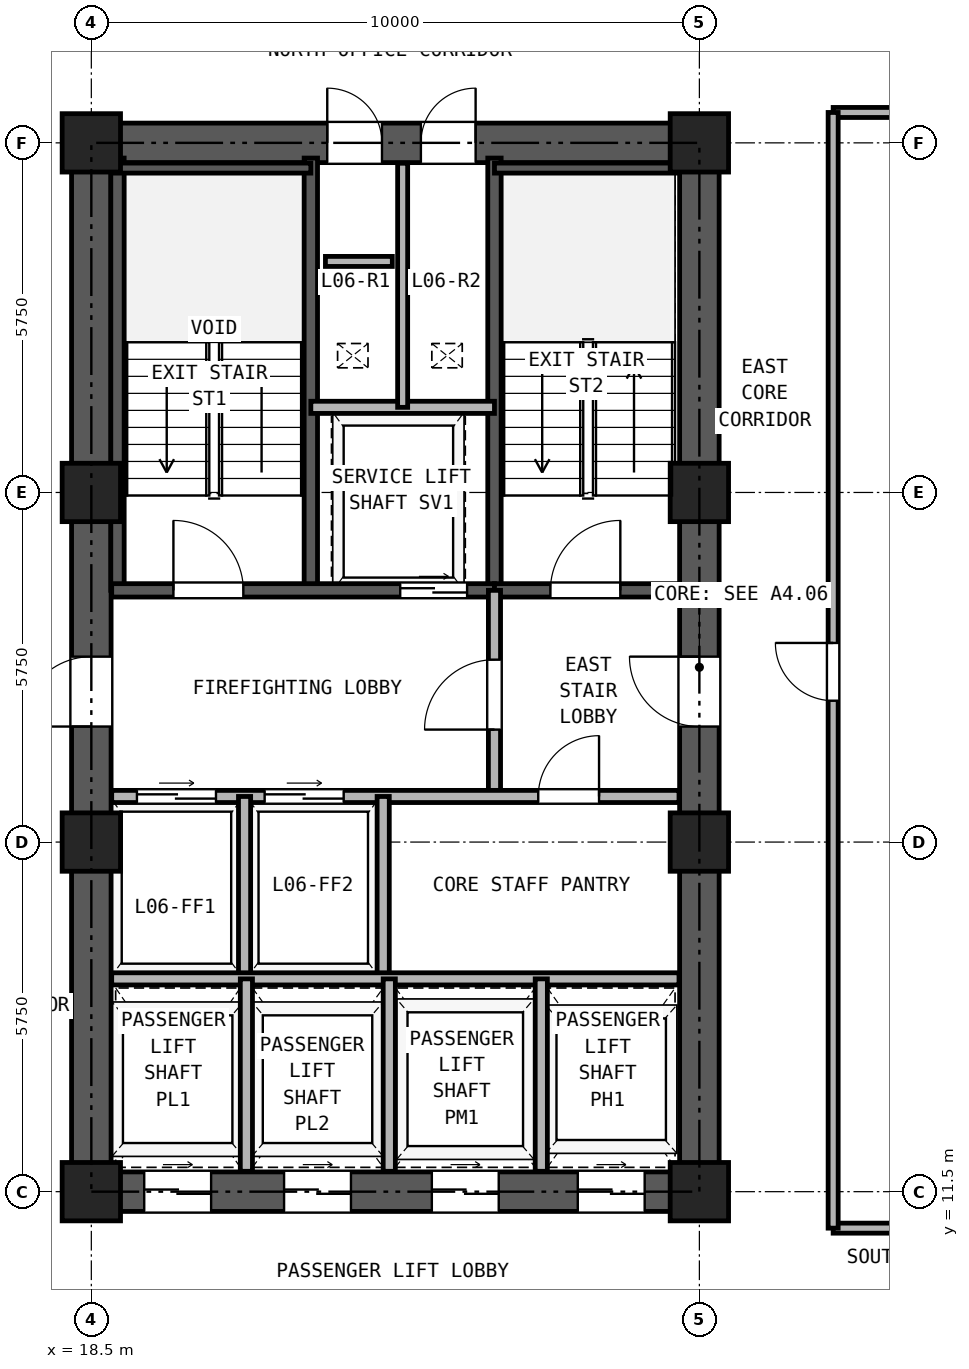
"""IFC4 building model, lengths in metres.
Left out: names, types, materials, properties, quantities, classifications, styles, units other than length and angle.
Written with IfcOpenShell. Run it as: python <this file> out.ifc"""

import sys

from ifc_helpers import new_model, si_unit, direction, frame, frame_2d, origin, origin_2d, place, context, subcontext, project, spatial, rectangle, hollow_rectangle, extrude, source, transform, mapped, element, fill, save


model = new_model("IFC4")
c1 = context("Model", 3, precision=1e-05, world=origin(), true_north=direction((0.0, 1.0)))
c2 = subcontext(c1, "Body", "Model", "MODEL_VIEW")
j1 = project(units=[si_unit("LENGTHUNIT", "METRE"), si_unit("PLANEANGLEUNIT", "RADIAN")], contexts=[c1])
p1 = place(None, origin())
s1 = spatial("IfcSite", under=j1, at=p1, CompositionType="ELEMENT")
p2 = place(p1, origin())
s2 = spatial("IfcBuilding", under=s1, at=p2, CompositionType="ELEMENT")
p3 = place(p2, frame((0.0, 0.0, 26.1)))
s3 = spatial("IfcBuildingStorey", under=s2, at=p3, CompositionType="ELEMENT", Elevation=26.1)
m1 = source(origin(), c2, "Body", "SweptSolid", [
    extrude(hollow_rectangle(XDim=0.96, YDim=0.96, WallThickness=0.06, at=origin_2d()), origin(), (0.0, 0.0, 1.0), 3.32),
])
for number, where, z_axis, x_axis in (
    (1, (18.5, 11.5, 0.0), (0.0, 0.0, 1.0), (1.0, 0.0, 0.0)),
    (2, (18.5, 17.25, 0.0), (0.0, 0.0, 1.0), (1.0, 0.0, 0.0)),
    (3, (18.5, 23.0, 0.0), (0.0, 0.0, 1.0), (1.0, 0.0, 0.0)),
    (4, (18.5, 28.75, 0.0), (0.0, 0.0, 1.0), (1.0, 0.0, 0.0)),
    (5, (28.5, 11.5, 0.0), (0.0, 0.0, 1.0), (1.0, 0.0, 0.0)),
    (6, (28.5, 17.25, 0.0), (0.0, 0.0, 1.0), (1.0, 0.0, 0.0)),
    (7, (28.5, 23.0, 0.0), (0.0, 0.0, 1.0), (1.0, 0.0, 0.0)),
    (8, (28.5, 28.75, 0.0), (0.0, 0.0, 1.0), (1.0, 0.0, 0.0)),
):
    element("IfcColumn", number, at=place(p3, frame(where, z_axis=z_axis, x_axis=x_axis)), inside=s3, PredefinedType="COLUMN", context=c2, shape_type="MappedRepresentation", body=[
        mapped(m1, transform((0.0, 0.0, 0.0), x_axis=(1.0, 0.0, 0.0), y_axis=(0.0, 1.0, 0.0), z_axis=(0.0, 0.0, 1.0), scale=1.0)),
    ])
p4 = place(p3, frame((18.175, 11.5, 0.0), z_axis=(0.0, 0.0, 1.0), x_axis=(1.0, 0.0, 0.0)))
e9 = element("IfcWall", 9, at=p4, inside=s3, PredefinedType="SHEAR", context=c2, shape_type="SweptSolid", body=[
    extrude(rectangle(XDim=10.65, YDim=0.65, at=frame_2d((5.325, 0.0))), origin(), (0.0, 0.0, 1.0), 3.32),
])
p5 = place(p4, frame((1.195, 0.0, 0.0)))
e10 = element("IfcOpeningElement", 10, at=p5, cuts=e9, PredefinedType="OPENING", context=c2, shape_type="SweptSolid", body=[
    extrude(rectangle(XDim=1.1, YDim=2.25, at=frame_2d((0.55, 1.125))), frame((0.0, 0.335, 0.0), z_axis=(0.0, -1.0, 0.0), x_axis=(1.0, 0.0, 0.0)), (0.0, 0.0, 1.0), 0.67),
])
p6 = place(p4, frame((3.495, 0.0, 0.0)))
e11 = element("IfcOpeningElement", 11, at=p6, cuts=e9, PredefinedType="OPENING", context=c2, shape_type="SweptSolid", body=[
    extrude(rectangle(XDim=1.1, YDim=2.25, at=frame_2d((0.55, 1.125))), frame((0.0, 0.335, 0.0), z_axis=(0.0, -1.0, 0.0), x_axis=(1.0, 0.0, 0.0)), (0.0, 0.0, 1.0), 0.67),
])
p7 = place(p4, frame((5.925, 0.0, 0.0)))
e12 = element("IfcOpeningElement", 12, at=p7, cuts=e9, PredefinedType="OPENING", context=c2, shape_type="SweptSolid", body=[
    extrude(rectangle(XDim=1.1, YDim=2.25, at=frame_2d((0.55, 1.125))), frame((0.0, 0.335, 0.0), z_axis=(0.0, -1.0, 0.0), x_axis=(1.0, 0.0, 0.0)), (0.0, 0.0, 1.0), 0.67),
])
p8 = place(p4, frame((8.325, 0.0, 0.0)))
e13 = element("IfcOpeningElement", 13, at=p8, cuts=e9, PredefinedType="OPENING", context=c2, shape_type="SweptSolid", body=[
    extrude(rectangle(XDim=1.1, YDim=2.25, at=frame_2d((0.55, 1.125))), frame((0.0, 0.335, 0.0), z_axis=(0.0, -1.0, 0.0), x_axis=(1.0, 0.0, 0.0)), (0.0, 0.0, 1.0), 0.67),
])
p9 = place(p3, frame((18.175, 28.75, 0.0), z_axis=(0.0, 0.0, 1.0), x_axis=(1.0, 0.0, 0.0)))
e14 = element("IfcWall", 14, at=p9, inside=s3, PredefinedType="SHEAR", context=c2, shape_type="SweptSolid", body=[
    extrude(rectangle(XDim=10.65, YDim=0.65, at=frame_2d((5.325, 0.0))), origin(), (0.0, 0.0, 1.0), 3.32),
])
p10 = place(p9, frame((4.205, 0.0, 0.0)))
e15 = element("IfcOpeningElement", 15, at=p10, cuts=e14, PredefinedType="OPENING", context=c2, shape_type="SweptSolid", body=[
    extrude(rectangle(XDim=0.9, YDim=2.05, at=frame_2d((0.45, 1.025))), frame((0.0, 0.335, 0.0), z_axis=(0.0, -1.0, 0.0), x_axis=(1.0, 0.0, 0.0)), (0.0, 0.0, 1.0), 0.67),
])
p11 = place(p9, frame((5.745, 0.0, 0.0)))
e16 = element("IfcOpeningElement", 16, at=p11, cuts=e14, PredefinedType="OPENING", context=c2, shape_type="SweptSolid", body=[
    extrude(rectangle(XDim=0.9, YDim=2.05, at=frame_2d((0.45, 1.025))), frame((0.0, 0.335, 0.0), z_axis=(0.0, -1.0, 0.0), x_axis=(1.0, 0.0, 0.0)), (0.0, 0.0, 1.0), 0.67),
])
p12 = place(p3, frame((18.5, 11.825, 0.0), z_axis=(0.0, 0.0, 1.0), x_axis=(0.0, 1.0, 0.0)))
e17 = element("IfcWall", 17, at=p12, inside=s3, PredefinedType="SHEAR", context=c2, shape_type="SweptSolid", body=[
    extrude(rectangle(XDim=16.6, YDim=0.65, at=frame_2d((8.3, 0.0))), origin(), (0.0, 0.0, 1.0), 3.32),
])
p13 = place(p12, frame((7.325, 0.0, 0.0)))
e18 = element("IfcOpeningElement", 18, at=p13, cuts=e17, PredefinedType="OPENING", context=c2, shape_type="SweptSolid", body=[
    extrude(rectangle(XDim=1.15, YDim=2.2, at=frame_2d((0.575, 1.1))), frame((0.0, 0.335, 0.0), z_axis=(0.0, -1.0, 0.0), x_axis=(1.0, 0.0, 0.0)), (0.0, 0.0, 1.0), 0.67),
])
p14 = place(p3, frame((28.5, 11.825, 0.0), z_axis=(0.0, 0.0, 1.0), x_axis=(0.0, 1.0, 0.0)))
e19 = element("IfcWall", 19, at=p14, inside=s3, PredefinedType="SHEAR", context=c2, shape_type="SweptSolid", body=[
    extrude(rectangle(XDim=16.6, YDim=0.65, at=frame_2d((8.3, 0.0))), origin(), (0.0, 0.0, 1.0), 3.32),
])
p15 = place(p14, frame((7.325, 0.0, 0.0)))
e20 = element("IfcOpeningElement", 20, at=p15, cuts=e19, PredefinedType="OPENING", context=c2, shape_type="SweptSolid", body=[
    extrude(rectangle(XDim=1.15, YDim=2.2, at=frame_2d((0.575, 1.1))), frame((0.0, 0.335, 0.0), z_axis=(0.0, -1.0, 0.0), x_axis=(1.0, 0.0, 0.0)), (0.0, 0.0, 1.0), 0.67),
])
for number, where, z_axis, x_axis in (
    (21, (18.93, 21.39, 0.0), (0.0, 0.0, 1.0), (0.0, 1.0, 0.0)),
    (22, (22.11, 21.39, 0.0), (0.0, 0.0, 1.0), (0.0, 1.0, 0.0)),
    (23, (25.13, 21.39, 0.0), (0.0, 0.0, 1.0), (0.0, 1.0, 0.0)),
):
    element("IfcWall", number, at=place(p3, frame(where, z_axis=z_axis, x_axis=x_axis)), inside=s3, PredefinedType="SOLIDWALL", context=c2, shape_type="SweptSolid", body=[
        extrude(rectangle(XDim=7.11, YDim=0.22, at=frame_2d((3.555, 0.0))), origin(), (0.0, 0.0, 1.0), 3.32),
    ])
p16 = place(p3, frame((18.835, 28.335, 0.0), z_axis=(0.0, 0.0, 1.0), x_axis=(1.0, 0.0, 0.0)))
e24 = element("IfcWall", 24, at=p16, inside=s3, PredefinedType="PARTITIONING", context=c2, shape_type="SweptSolid", body=[
    extrude(rectangle(XDim=3.275, YDim=0.165, at=frame_2d((1.638, 0.0))), origin(), (0.0, 0.0, 1.0), 3.32),
])
p17 = place(p3, frame((25.13, 28.335, 0.0), z_axis=(0.0, 0.0, 1.0), x_axis=(1.0, 0.0, 0.0)))
e25 = element("IfcWall", 25, at=p17, inside=s3, PredefinedType="PARTITIONING", context=c2, shape_type="SweptSolid", body=[
    extrude(rectangle(XDim=3.035, YDim=0.165, at=frame_2d((1.518, 0.0))), origin(), (0.0, 0.0, 1.0), 3.32),
])
p18 = place(p3, frame((18.835, 21.39, 0.0), z_axis=(0.0, 0.0, 1.0), x_axis=(1.0, 0.0, 0.0)))
e26 = element("IfcWall", 26, at=p18, inside=s3, PredefinedType="SOLIDWALL", context=c2, shape_type="SweptSolid", body=[
    extrude(rectangle(XDim=6.295, YDim=0.22, at=frame_2d((3.147, 0.0))), origin(), (0.0, 0.0, 1.0), 3.32),
])
p19 = place(p18, frame((1.015, 0.0, 0.0)))
e27 = element("IfcOpeningElement", 27, at=p19, cuts=e26, PredefinedType="OPENING", context=c2, shape_type="SweptSolid", body=[
    extrude(rectangle(XDim=1.15, YDim=2.2, at=frame_2d((0.575, 1.1))), frame((0.0, 0.12, 0.0), z_axis=(0.0, -1.0, 0.0), x_axis=(1.0, 0.0, 0.0)), (0.0, 0.0, 1.0), 0.24),
])
p20 = place(p18, frame((4.745, 0.0, 0.0)))
e28 = element("IfcOpeningElement", 28, at=p20, cuts=e26, PredefinedType="OPENING", context=c2, shape_type="SweptSolid", body=[
    extrude(rectangle(XDim=1.1, YDim=2.25, at=frame_2d((0.55, 1.125))), frame((0.0, 0.12, 0.0), z_axis=(0.0, -1.0, 0.0), x_axis=(1.0, 0.0, 0.0)), (0.0, 0.0, 1.0), 0.24),
])
p21 = place(p3, frame((25.13, 21.39, 0.0), z_axis=(0.0, 0.0, 1.0), x_axis=(1.0, 0.0, 0.0)))
e29 = element("IfcWall", 29, at=p21, inside=s3, PredefinedType="SOLIDWALL", context=c2, shape_type="SweptSolid", body=[
    extrude(rectangle(XDim=3.035, YDim=0.22, at=frame_2d((1.518, 0.0))), origin(), (0.0, 0.0, 1.0), 3.32),
])
p22 = place(p21, frame((0.92, 0.0, 0.0)))
e30 = element("IfcOpeningElement", 30, at=p22, cuts=e29, PredefinedType="OPENING", context=c2, shape_type="SweptSolid", body=[
    extrude(rectangle(XDim=1.15, YDim=2.2, at=frame_2d((0.575, 1.1))), frame((0.0, 0.12, 0.0), z_axis=(0.0, -1.0, 0.0), x_axis=(1.0, 0.0, 0.0)), (0.0, 0.0, 1.0), 0.24),
])
p23 = place(p3, frame((22.11, 24.4, 0.0), z_axis=(0.0, 0.0, 1.0), x_axis=(1.0, 0.0, 0.0)))
e31 = element("IfcWall", 31, at=p23, inside=s3, PredefinedType="PARTITIONING", context=c2, shape_type="SweptSolid", body=[
    extrude(rectangle(XDim=3.02, YDim=0.2, at=frame_2d((1.51, 0.0))), origin(), (0.0, 0.0, 1.0), 3.32),
])
p24 = place(p3, frame((23.62, 24.4, 0.0), z_axis=(0.0, 0.0, 1.0), x_axis=(0.0, 1.0, 0.0)))
e32 = element("IfcWall", 32, at=p24, inside=s3, PredefinedType="PARTITIONING", context=c2, shape_type="SweptSolid", body=[
    extrude(rectangle(XDim=4.015, YDim=0.165, at=frame_2d((2.008, 0.0))), origin(), (0.0, 0.0, 1.0), 3.32),
])
p25 = place(p3, frame((25.13, 18.0, 0.0), z_axis=(0.0, 0.0, 1.0), x_axis=(0.0, 1.0, 0.0)))
e33 = element("IfcWall", 33, at=p25, inside=s3, PredefinedType="PARTITIONING", context=c2, shape_type="SweptSolid", body=[
    extrude(rectangle(XDim=3.39, YDim=0.2, at=frame_2d((1.695, 0.0))), origin(), (0.0, 0.0, 1.0), 3.32),
])
p26 = place(p25, frame((1.1, 0.0, 0.0)))
e34 = element("IfcOpeningElement", 34, at=p26, cuts=e33, PredefinedType="OPENING", context=c2, shape_type="SweptSolid", body=[
    extrude(rectangle(XDim=1.15, YDim=2.2, at=frame_2d((0.575, 1.1))), frame((0.0, 0.11, 0.0), z_axis=(0.0, -1.0, 0.0), x_axis=(1.0, 0.0, 0.0)), (0.0, 0.0, 1.0), 0.22),
])
p27 = place(p3, frame((18.835, 18.0, 0.0), z_axis=(0.0, 0.0, 1.0), x_axis=(1.0, 0.0, 0.0)))
e35 = element("IfcWall", 35, at=p27, inside=s3, PredefinedType="PARTITIONING", context=c2, shape_type="SweptSolid", body=[
    extrude(rectangle(XDim=9.33, YDim=0.2, at=frame_2d((4.665, 0.0))), origin(), (0.0, 0.0, 1.0), 3.32),
])
p28 = place(p27, frame((0.415, 0.0, 0.0)))
e36 = element("IfcOpeningElement", 36, at=p28, cuts=e35, PredefinedType="OPENING", context=c2, shape_type="SweptSolid", body=[
    extrude(rectangle(XDim=1.3, YDim=2.3, at=frame_2d((0.65, 1.15))), frame((0.0, 0.11, 0.0), z_axis=(0.0, -1.0, 0.0), x_axis=(1.0, 0.0, 0.0)), (0.0, 0.0, 1.0), 0.22),
])
p29 = place(p27, frame((2.515, 0.0, 0.0)))
e37 = element("IfcOpeningElement", 37, at=p29, cuts=e35, PredefinedType="OPENING", context=c2, shape_type="SweptSolid", body=[
    extrude(rectangle(XDim=1.3, YDim=2.3, at=frame_2d((0.65, 1.15))), frame((0.0, 0.11, 0.0), z_axis=(0.0, -1.0, 0.0), x_axis=(1.0, 0.0, 0.0)), (0.0, 0.0, 1.0), 0.22),
])
p30 = place(p27, frame((7.015, 0.0, 0.0)))
e38 = element("IfcOpeningElement", 38, at=p30, cuts=e35, PredefinedType="OPENING", context=c2, shape_type="SweptSolid", body=[
    extrude(rectangle(XDim=1.0, YDim=2.15, at=frame_2d((0.5, 1.075))), frame((0.0, 0.11, 0.0), z_axis=(0.0, -1.0, 0.0), x_axis=(1.0, 0.0, 0.0)), (0.0, 0.0, 1.0), 0.22),
])
for number, where, z_axis, x_axis in (
    (39, (21.02, 15.0, 0.0), (0.0, 0.0, 1.0), (0.0, 1.0, 0.0)),
    (40, (23.3, 15.0, 0.0), (0.0, 0.0, 1.0), (0.0, 1.0, 0.0)),
):
    element("IfcWall", number, at=place(p3, frame(where, z_axis=z_axis, x_axis=x_axis)), inside=s3, PredefinedType="PARTITIONING", context=c2, shape_type="SweptSolid", body=[
        extrude(rectangle(XDim=3.0, YDim=0.2, at=frame_2d((1.5, 0.0))), origin(), (0.0, 0.0, 1.0), 3.32),
    ])
p31 = place(p3, frame((18.835, 15.0, 0.0), z_axis=(0.0, 0.0, 1.0), x_axis=(1.0, 0.0, 0.0)))
e41 = element("IfcWall", 41, at=p31, inside=s3, PredefinedType="PARTITIONING", context=c2, shape_type="SweptSolid", body=[
    extrude(rectangle(XDim=9.33, YDim=0.2, at=frame_2d((4.665, 0.0))), origin(), (0.0, 0.0, 1.0), 3.32),
])
for number, where, z_axis, x_axis in (
    (42, (21.05, 11.835, 0.0), (0.0, 0.0, 1.0), (0.0, 1.0, 0.0)),
    (43, (23.4, 11.835, 0.0), (0.0, 0.0, 1.0), (0.0, 1.0, 0.0)),
    (44, (25.9, 11.835, 0.0), (0.0, 0.0, 1.0), (0.0, 1.0, 0.0)),
):
    element("IfcWall", number, at=place(p3, frame(where, z_axis=z_axis, x_axis=x_axis)), inside=s3, PredefinedType="PARTITIONING", context=c2, shape_type="SweptSolid", body=[
        extrude(rectangle(XDim=3.165, YDim=0.2, at=frame_2d((1.583, 0.0))), origin(), (0.0, 0.0, 1.0), 3.32),
    ])
for number, where, z_axis, x_axis in (
    (45, (30.7, 10.9, 0.0), (0.0, 0.0, 1.0), (1.0, 0.0, 0.0)),
    (46, (30.7, 29.25, 0.0), (0.0, 0.0, 1.0), (1.0, 0.0, 0.0)),
):
    element("IfcWall", number, at=place(p3, frame(where, z_axis=z_axis, x_axis=x_axis)), inside=s3, PredefinedType="PARTITIONING", context=c2, shape_type="SweptSolid", body=[
        extrude(rectangle(XDim=8.1, YDim=0.165, at=frame_2d((4.05, 0.0))), origin(), (0.0, 0.0, 1.0), 3.32),
    ])
p32 = place(p3, frame((30.7, 10.9, 0.0), z_axis=(0.0, 0.0, 1.0), x_axis=(0.0, 1.0, 0.0)))
e47 = element("IfcWall", 47, at=p32, inside=s3, PredefinedType="PARTITIONING", context=c2, shape_type="SweptSolid", body=[
    extrude(rectangle(XDim=18.35, YDim=0.165, at=frame_2d((9.175, 0.0))), origin(), (0.0, 0.0, 1.0), 3.32),
])
p33 = place(p32, frame((8.675, 0.0, 0.0)))
e48 = element("IfcOpeningElement", 48, at=p33, cuts=e47, PredefinedType="OPENING", context=c2, shape_type="SweptSolid", body=[
    extrude(rectangle(XDim=0.95, YDim=2.15, at=frame_2d((0.475, 1.075))), frame((0.0, 0.093, 0.0), z_axis=(0.0, -1.0, 0.0), x_axis=(1.0, 0.0, 0.0)), (0.0, 0.0, 1.0), 0.185),
])
p34 = place(p3, frame((22.35, 26.8, 0.0), z_axis=(0.0, 0.0, 1.0), x_axis=(1.0, 0.0, 0.0)))
e49 = element("IfcWall", 49, at=p34, inside=s3, PredefinedType="PARTITIONING", context=c2, shape_type="SweptSolid", body=[
    extrude(rectangle(XDim=1.1, YDim=0.165, at=frame_2d((0.55, 0.0))), origin(), (0.0, 0.0, 1.0), 3.32),
])
p35 = place(p19, frame((1.15, 0.0, 0.0), z_axis=(0.0, 0.0, 1.0), x_axis=(-1.0, 0.0, 0.0)))
e50 = element("IfcDoor", 50, at=p35, inside=s3, OperationType="SINGLE_SWING_LEFT", PredefinedType="DOOR", context=c2, shape_type="SweptSolid", body=[
    extrude(rectangle(XDim=1.15, YDim=2.2, at=frame_2d((0.575, 1.1))), frame((0.0, 0.025, 0.0), z_axis=(0.0, -1.0, 0.0), x_axis=(1.0, 0.0, 0.0)), (0.0, 0.0, 1.0), 0.05),
])
fill(e27, e50)
p36 = place(p22, frame((1.15, 0.0, 0.0), z_axis=(0.0, 0.0, 1.0), x_axis=(-1.0, 0.0, 0.0)))
e51 = element("IfcDoor", 51, at=p36, inside=s3, OperationType="SINGLE_SWING_RIGHT", PredefinedType="DOOR", context=c2, shape_type="SweptSolid", body=[
    extrude(rectangle(XDim=1.15, YDim=2.2, at=frame_2d((0.575, 1.1))), frame((0.0, 0.025, 0.0), z_axis=(0.0, -1.0, 0.0), x_axis=(1.0, 0.0, 0.0)), (0.0, 0.0, 1.0), 0.05),
])
fill(e30, e51)
p37 = place(p20, frame((1.1, 0.0, 0.0), z_axis=(0.0, 0.0, 1.0), x_axis=(-1.0, 0.0, 0.0)))
e52 = element("IfcDoor", 52, at=p37, inside=s3, OperationType="DOUBLE_DOOR_SLIDING", PredefinedType="DOOR", context=c2, shape_type="SweptSolid", body=[
    extrude(rectangle(XDim=1.1, YDim=2.25, at=frame_2d((0.55, 1.125))), frame((0.0, 0.025, 0.0), z_axis=(0.0, -1.0, 0.0), x_axis=(1.0, 0.0, 0.0)), (0.0, 0.0, 1.0), 0.05),
])
fill(e28, e52)
p38 = place(p26, origin())
e53 = element("IfcDoor", 53, at=p38, inside=s3, OperationType="SINGLE_SWING_LEFT", PredefinedType="DOOR", context=c2, shape_type="SweptSolid", body=[
    extrude(rectangle(XDim=1.15, YDim=2.2, at=frame_2d((0.575, 1.1))), frame((0.0, 0.025, 0.0), z_axis=(0.0, -1.0, 0.0), x_axis=(1.0, 0.0, 0.0)), (0.0, 0.0, 1.0), 0.05),
])
fill(e34, e53)
p39 = place(p28, origin())
e54 = element("IfcDoor", 54, at=p39, inside=s3, OperationType="DOUBLE_DOOR_SLIDING", PredefinedType="DOOR", context=c2, shape_type="SweptSolid", body=[
    extrude(rectangle(XDim=1.3, YDim=2.3, at=frame_2d((0.65, 1.15))), frame((0.0, 0.025, 0.0), z_axis=(0.0, -1.0, 0.0), x_axis=(1.0, 0.0, 0.0)), (0.0, 0.0, 1.0), 0.05),
])
fill(e36, e54)
p40 = place(p29, origin())
e55 = element("IfcDoor", 55, at=p40, inside=s3, OperationType="DOUBLE_DOOR_SLIDING", PredefinedType="DOOR", context=c2, shape_type="SweptSolid", body=[
    extrude(rectangle(XDim=1.3, YDim=2.3, at=frame_2d((0.65, 1.15))), frame((0.0, 0.025, 0.0), z_axis=(0.0, -1.0, 0.0), x_axis=(1.0, 0.0, 0.0)), (0.0, 0.0, 1.0), 0.05),
])
fill(e37, e55)
p41 = place(p30, frame((1.0, 0.0, 0.0), z_axis=(0.0, 0.0, 1.0), x_axis=(-1.0, 0.0, 0.0)))
e56 = element("IfcDoor", 56, at=p41, inside=s3, OperationType="SINGLE_SWING_RIGHT", PredefinedType="DOOR", context=c2, shape_type="SweptSolid", body=[
    extrude(rectangle(XDim=1.0, YDim=2.15, at=frame_2d((0.5, 1.075))), frame((0.0, 0.025, 0.0), z_axis=(0.0, -1.0, 0.0), x_axis=(1.0, 0.0, 0.0)), (0.0, 0.0, 1.0), 0.05),
])
fill(e38, e56)
p42 = place(p13, frame((1.15, 0.0, 0.0), z_axis=(0.0, 0.0, 1.0), x_axis=(-1.0, 0.0, 0.0)))
e57 = element("IfcDoor", 57, at=p42, inside=s3, OperationType="SINGLE_SWING_LEFT", PredefinedType="DOOR", context=c2, shape_type="SweptSolid", body=[
    extrude(rectangle(XDim=1.15, YDim=2.2, at=frame_2d((0.575, 1.1))), frame((0.0, 0.025, 0.0), z_axis=(0.0, -1.0, 0.0), x_axis=(1.0, 0.0, 0.0)), (0.0, 0.0, 1.0), 0.05),
])
fill(e18, e57)
p43 = place(p15, origin())
e58 = element("IfcDoor", 58, at=p43, inside=s3, OperationType="SINGLE_SWING_RIGHT", PredefinedType="DOOR", context=c2, shape_type="SweptSolid", body=[
    extrude(rectangle(XDim=1.15, YDim=2.2, at=frame_2d((0.575, 1.1))), frame((0.0, 0.025, 0.0), z_axis=(0.0, -1.0, 0.0), x_axis=(1.0, 0.0, 0.0)), (0.0, 0.0, 1.0), 0.05),
])
fill(e20, e58)
p44 = place(p10, origin())
e59 = element("IfcDoor", 59, at=p44, inside=s3, OperationType="SINGLE_SWING_LEFT", PredefinedType="DOOR", context=c2, shape_type="SweptSolid", body=[
    extrude(rectangle(XDim=0.9, YDim=2.05, at=frame_2d((0.45, 1.025))), frame((0.0, 0.025, 0.0), z_axis=(0.0, -1.0, 0.0), x_axis=(1.0, 0.0, 0.0)), (0.0, 0.0, 1.0), 0.05),
])
fill(e15, e59)
p45 = place(p11, origin())
e60 = element("IfcDoor", 60, at=p45, inside=s3, OperationType="SINGLE_SWING_RIGHT", PredefinedType="DOOR", context=c2, shape_type="SweptSolid", body=[
    extrude(rectangle(XDim=0.9, YDim=2.05, at=frame_2d((0.45, 1.025))), frame((0.0, 0.025, 0.0), z_axis=(0.0, -1.0, 0.0), x_axis=(1.0, 0.0, 0.0)), (0.0, 0.0, 1.0), 0.05),
])
fill(e16, e60)
p46 = place(p5, frame((1.1, 0.0, 0.0), z_axis=(0.0, 0.0, 1.0), x_axis=(-1.0, 0.0, 0.0)))
e61 = element("IfcDoor", 61, at=p46, inside=s3, OperationType="DOUBLE_DOOR_SLIDING", PredefinedType="DOOR", context=c2, shape_type="SweptSolid", body=[
    extrude(rectangle(XDim=1.1, YDim=2.25, at=frame_2d((0.55, 1.125))), frame((0.0, 0.025, 0.0), z_axis=(0.0, -1.0, 0.0), x_axis=(1.0, 0.0, 0.0)), (0.0, 0.0, 1.0), 0.05),
])
fill(e10, e61)
p47 = place(p6, frame((1.1, 0.0, 0.0), z_axis=(0.0, 0.0, 1.0), x_axis=(-1.0, 0.0, 0.0)))
e62 = element("IfcDoor", 62, at=p47, inside=s3, OperationType="DOUBLE_DOOR_SLIDING", PredefinedType="DOOR", context=c2, shape_type="SweptSolid", body=[
    extrude(rectangle(XDim=1.1, YDim=2.25, at=frame_2d((0.55, 1.125))), frame((0.0, 0.025, 0.0), z_axis=(0.0, -1.0, 0.0), x_axis=(1.0, 0.0, 0.0)), (0.0, 0.0, 1.0), 0.05),
])
fill(e11, e62)
p48 = place(p7, frame((1.1, 0.0, 0.0), z_axis=(0.0, 0.0, 1.0), x_axis=(-1.0, 0.0, 0.0)))
e63 = element("IfcDoor", 63, at=p48, inside=s3, OperationType="DOUBLE_DOOR_SLIDING", PredefinedType="DOOR", context=c2, shape_type="SweptSolid", body=[
    extrude(rectangle(XDim=1.1, YDim=2.25, at=frame_2d((0.55, 1.125))), frame((0.0, 0.025, 0.0), z_axis=(0.0, -1.0, 0.0), x_axis=(1.0, 0.0, 0.0)), (0.0, 0.0, 1.0), 0.05),
])
fill(e12, e63)
p49 = place(p8, frame((1.1, 0.0, 0.0), z_axis=(0.0, 0.0, 1.0), x_axis=(-1.0, 0.0, 0.0)))
e64 = element("IfcDoor", 64, at=p49, inside=s3, OperationType="DOUBLE_DOOR_SLIDING", PredefinedType="DOOR", context=c2, shape_type="SweptSolid", body=[
    extrude(rectangle(XDim=1.1, YDim=2.25, at=frame_2d((0.55, 1.125))), frame((0.0, 0.025, 0.0), z_axis=(0.0, -1.0, 0.0), x_axis=(1.0, 0.0, 0.0)), (0.0, 0.0, 1.0), 0.05),
])
fill(e13, e64)
p50 = place(p33, origin())
e65 = element("IfcDoor", 65, at=p50, inside=s3, OperationType="SINGLE_SWING_RIGHT", PredefinedType="DOOR", context=c2, shape_type="SweptSolid", body=[
    extrude(rectangle(XDim=0.95, YDim=2.15, at=frame_2d((0.475, 1.075))), frame((0.0, 0.025, 0.0), z_axis=(0.0, -1.0, 0.0), x_axis=(1.0, 0.0, 0.0)), (0.0, 0.0, 1.0), 0.05),
])
fill(e48, e65)
save(model, sys.argv[1])
